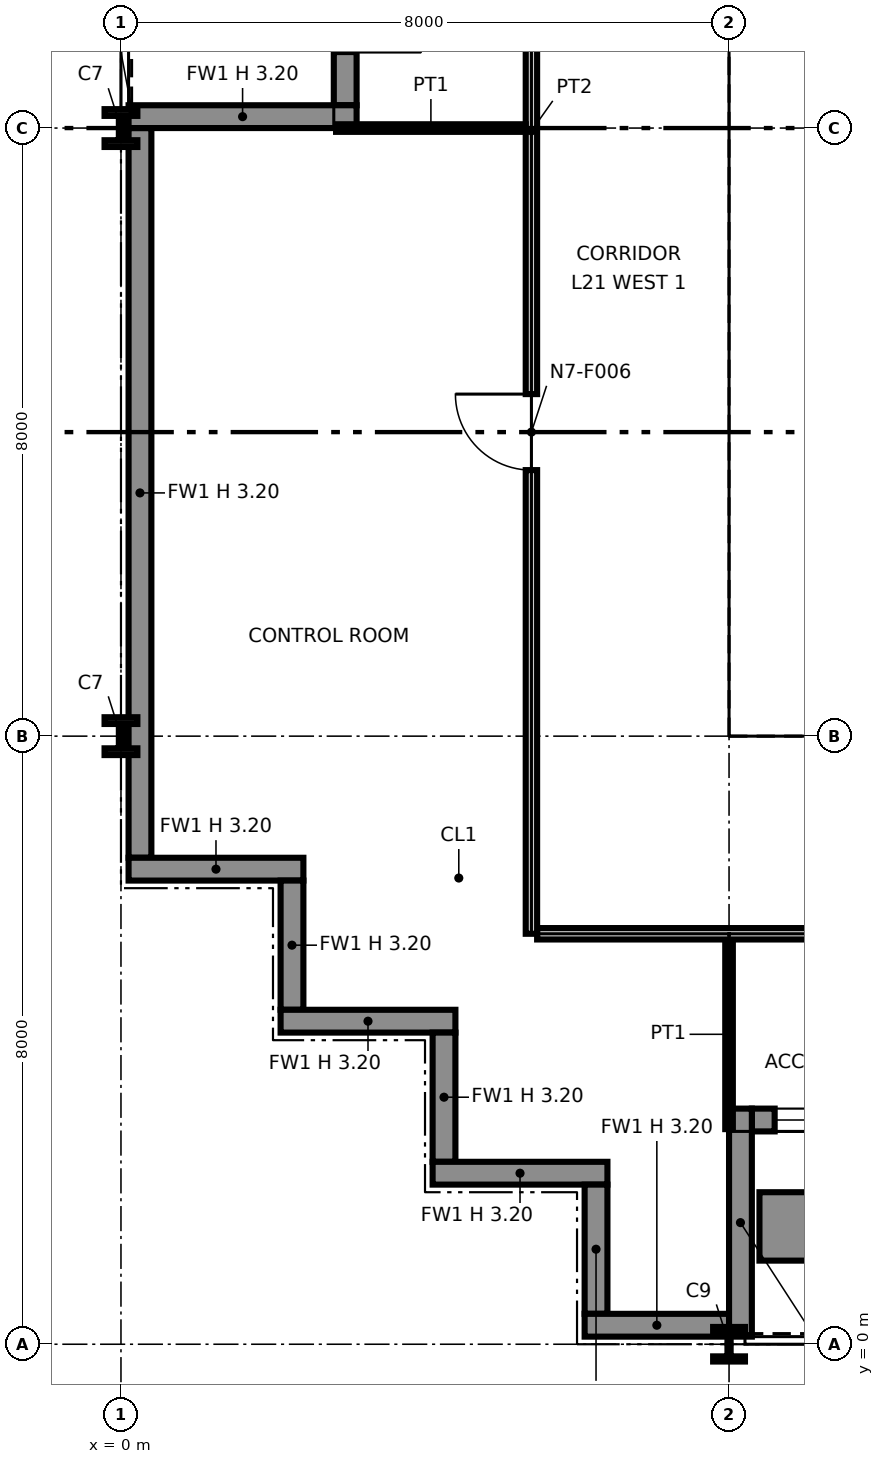
"""IFC4 building model, lengths in metres.
Left out: names, types, materials, properties, quantities, classifications, styles, units other than length and angle.
Written with IfcOpenShell. Run it as: python <this file> out.ifc"""

import sys

from ifc_helpers import new_model, si_unit, direction, frame, frame_2d, origin, origin_2d, place, context, subcontext, project, spatial, polyline, rectangle, i_section, outline, extrude, element, fill, save


model = new_model("IFC4")
c1 = context("Model", 3, precision=1e-05, world=origin(), true_north=direction((0.0, 1.0)))
c2 = subcontext(c1, "Body", "Model", "MODEL_VIEW")
j1 = project(units=[si_unit("LENGTHUNIT", "METRE"), si_unit("PLANEANGLEUNIT", "RADIAN")], contexts=[c1])
p1 = place(None, origin())
s1 = spatial("IfcSite", under=j1, at=p1, CompositionType="ELEMENT")
p2 = place(p1, origin())
s2 = spatial("IfcBuilding", under=s1, at=p2, CompositionType="ELEMENT")
p3 = place(p2, frame((0.0, 0.0, 109.6)))
s3 = spatial("IfcBuildingStorey", under=s2, at=p3, CompositionType="ELEMENT", Elevation=109.6)
for number, where, z_axis, x_axis in (
    (1, (0.0, 8.0, 0.0), (0.0, 0.0, 1.0), (1.0, 0.0, 0.0)),
    (2, (0.0, 16.0, 0.0), (0.0, 0.0, 1.0), (1.0, 0.0, 0.0)),
):
    element("IfcColumn", number, at=place(p3, frame(where, z_axis=z_axis, x_axis=x_axis)), inside=s3, PredefinedType="COLUMN", context=c2, shape_type="SweptSolid", body=[
        extrude(i_section(OverallWidth=0.432, OverallDepth=0.498, WebThickness=0.056, FlangeThickness=0.089, at=origin_2d()), origin(), (0.0, 0.0, 1.0), 4.15),
    ])
p4 = place(p3, frame((8.0, 0.0, 0.0), z_axis=(0.0, 0.0, 1.0), x_axis=(1.0, 0.0, 0.0)))
e3 = element("IfcColumn", 3, at=p4, inside=s3, PredefinedType="COLUMN", context=c2, shape_type="SweptSolid", body=[
    extrude(i_section(OverallWidth=0.419, OverallDepth=0.455, WebThickness=0.042, FlangeThickness=0.068, at=origin_2d()), origin(), (0.0, 0.0, 1.0), 4.15),
])
for number, where, z_axis, x_axis in (
    (4, (8.0, 8.0, 0.0), (0.0, 0.0, 1.0), (1.0, 0.0, 0.0)),
    (5, (8.0, 16.0, 0.0), (0.0, 0.0, 1.0), (1.0, 0.0, 0.0)),
):
    element("IfcColumn", number, at=place(p3, frame(where, z_axis=z_axis, x_axis=x_axis)), inside=s3, PredefinedType="COLUMN", context=c2, shape_type="SweptSolid", body=[
        extrude(i_section(OverallWidth=0.406, OverallDepth=0.417, WebThickness=0.03, FlangeThickness=0.048, at=origin_2d()), origin(), (0.0, 0.0, 1.0), 4.15),
    ])
p5 = place(p3, frame((2.95, 23.7, 0.0), z_axis=(0.0, 0.0, 1.0), x_axis=(0.0, -1.0, 0.0)))
e6 = element("IfcWall", 6, at=p5, inside=s3, PredefinedType="SOLIDWALL", context=c2, shape_type="SweptSolid", body=[
    extrude(rectangle(XDim=7.4, YDim=0.3, at=frame_2d((3.7, 0.0))), origin(), (0.0, 0.0, 1.0), 3.547),
])
p6 = place(p5, frame((0.3, 0.0, 0.9)))
e7 = element("IfcOpeningElement", 7, at=p6, cuts=e6, PredefinedType="OPENING", context=c2, shape_type="SweptSolid", body=[
    extrude(rectangle(XDim=2.8, YDim=2.2, at=frame_2d((1.4, 1.1))), frame((0.0, 0.16, 0.0), z_axis=(0.0, -1.0, 0.0), x_axis=(1.0, 0.0, 0.0)), (0.0, 0.0, 1.0), 0.32),
])
p7 = place(p5, frame((4.7, 0.0, 0.0)))
e8 = element("IfcOpeningElement", 8, at=p7, cuts=e6, PredefinedType="OPENING", context=c2, shape_type="SweptSolid", body=[
    extrude(rectangle(XDim=2.0, YDim=2.4, at=frame_2d((1.0, 1.2))), frame((0.0, 0.16, 0.0), z_axis=(0.0, -1.0, 0.0), x_axis=(1.0, 0.0, 0.0)), (0.0, 0.0, 1.0), 0.32),
])
p8 = place(p3, frame((0.1, 16.15, 0.0), z_axis=(0.0, 0.0, 1.0), x_axis=(1.0, 0.0, 0.0)))
e9 = element("IfcWall", 9, at=p8, inside=s3, PredefinedType="SOLIDWALL", context=c2, shape_type="SweptSolid", body=[
    extrude(rectangle(XDim=3.0, YDim=0.3, at=frame_2d((1.5, 0.0))), origin(), (0.0, 0.0, 1.0), 3.199),
])
p9 = place(p3, frame((0.25, 16.0, 0.0), z_axis=(0.0, 0.0, 1.0), x_axis=(0.0, -1.0, 0.0)))
e10 = element("IfcWall", 10, at=p9, inside=s3, PredefinedType="SOLIDWALL", context=c2, shape_type="SweptSolid", body=[
    extrude(rectangle(XDim=9.6, YDim=0.3, at=frame_2d((4.8, 0.0))), origin(), (0.0, 0.0, 1.0), 3.199),
])
p10 = place(p3, frame((0.1, 6.25, 0.0), z_axis=(0.0, 0.0, 1.0), x_axis=(1.0, 0.0, 0.0)))
e11 = element("IfcWall", 11, at=p10, inside=s3, PredefinedType="SOLIDWALL", context=c2, shape_type="SweptSolid", body=[
    extrude(rectangle(XDim=2.3, YDim=0.3, at=frame_2d((1.15, 0.0))), origin(), (0.0, 0.0, 1.0), 3.199),
])
p11 = place(p3, frame((2.25, 6.1, 0.0), z_axis=(0.0, 0.0, 1.0), x_axis=(0.0, -1.0, 0.0)))
e12 = element("IfcWall", 12, at=p11, inside=s3, PredefinedType="SOLIDWALL", context=c2, shape_type="SweptSolid", body=[
    extrude(rectangle(XDim=1.7, YDim=0.3, at=frame_2d((0.85, 0.0))), origin(), (0.0, 0.0, 1.0), 3.199),
])
p12 = place(p3, frame((2.1, 4.25, 0.0), z_axis=(0.0, 0.0, 1.0), x_axis=(1.0, 0.0, 0.0)))
e13 = element("IfcWall", 13, at=p12, inside=s3, PredefinedType="SOLIDWALL", context=c2, shape_type="SweptSolid", body=[
    extrude(rectangle(XDim=2.3, YDim=0.3, at=frame_2d((1.15, 0.0))), origin(), (0.0, 0.0, 1.0), 3.199),
])
p13 = place(p3, frame((4.25, 4.1, 0.0), z_axis=(0.0, 0.0, 1.0), x_axis=(0.0, -1.0, 0.0)))
e14 = element("IfcWall", 14, at=p13, inside=s3, PredefinedType="SOLIDWALL", context=c2, shape_type="SweptSolid", body=[
    extrude(rectangle(XDim=1.7, YDim=0.3, at=frame_2d((0.85, 0.0))), origin(), (0.0, 0.0, 1.0), 3.199),
])
p14 = place(p3, frame((4.1, 2.25, 0.0), z_axis=(0.0, 0.0, 1.0), x_axis=(1.0, 0.0, 0.0)))
e15 = element("IfcWall", 15, at=p14, inside=s3, PredefinedType="SOLIDWALL", context=c2, shape_type="SweptSolid", body=[
    extrude(rectangle(XDim=2.3, YDim=0.3, at=frame_2d((1.15, 0.0))), origin(), (0.0, 0.0, 1.0), 3.199),
])
p15 = place(p3, frame((6.25, 2.1, 0.0), z_axis=(0.0, 0.0, 1.0), x_axis=(0.0, -1.0, 0.0)))
e16 = element("IfcWall", 16, at=p15, inside=s3, PredefinedType="SOLIDWALL", context=c2, shape_type="SweptSolid", body=[
    extrude(rectangle(XDim=1.7, YDim=0.3, at=frame_2d((0.85, 0.0))), origin(), (0.0, 0.0, 1.0), 3.199),
])
p16 = place(p3, frame((6.1, 0.25, 0.0), z_axis=(0.0, 0.0, 1.0), x_axis=(1.0, 0.0, 0.0)))
e17 = element("IfcWall", 17, at=p16, inside=s3, PredefinedType="SOLIDWALL", context=c2, shape_type="SweptSolid", body=[
    extrude(rectangle(XDim=1.9, YDim=0.3, at=frame_2d((0.95, 0.0))), origin(), (0.0, 0.0, 1.0), 3.199),
])
p17 = place(p3, frame((8.3, 2.95, 0.0), z_axis=(0.0, 0.0, 1.0), x_axis=(1.0, 0.0, 0.0)))
e18 = element("IfcWall", 18, at=p17, inside=s3, PredefinedType="SOLIDWALL", context=c2, shape_type="SweptSolid", body=[
    extrude(rectangle(XDim=7.4, YDim=0.3, at=frame_2d((3.7, 0.0))), origin(), (0.0, 0.0, 1.0), 4.15),
])
p18 = place(p17, frame((0.3, 0.0, 0.9)))
e19 = element("IfcOpeningElement", 19, at=p18, cuts=e18, PredefinedType="OPENING", context=c2, shape_type="SweptSolid", body=[
    extrude(rectangle(XDim=2.8, YDim=2.2, at=frame_2d((1.4, 1.1))), frame((0.0, 0.16, 0.0), z_axis=(0.0, -1.0, 0.0), x_axis=(1.0, 0.0, 0.0)), (0.0, 0.0, 1.0), 0.32),
])
p19 = place(p17, frame((4.7, 0.0, 0.0)))
e20 = element("IfcOpeningElement", 20, at=p19, cuts=e18, PredefinedType="OPENING", context=c2, shape_type="SweptSolid", body=[
    extrude(rectangle(XDim=2.0, YDim=2.4, at=frame_2d((1.0, 1.2))), frame((0.0, 0.16, 0.0), z_axis=(0.0, -1.0, 0.0), x_axis=(1.0, 0.0, 0.0)), (0.0, 0.0, 1.0), 0.32),
])
p20 = place(p3, frame((8.15, 0.1, 0.0), z_axis=(0.0, 0.0, 1.0), x_axis=(0.0, 1.0, 0.0)))
e21 = element("IfcWall", 21, at=p20, inside=s3, PredefinedType="SOLIDWALL", context=c2, shape_type="SweptSolid", body=[
    extrude(rectangle(XDim=3.0, YDim=0.3, at=frame_2d((1.5, 0.0))), origin(), (0.0, 0.0, 1.0), 3.199),
])
p21 = place(p3, frame((8.4, 1.55, 0.0), z_axis=(0.0, 0.0, 1.0), x_axis=(1.0, 0.0, 0.0)))
e22 = element("IfcWall", 22, at=p21, inside=s3, PredefinedType="SOLIDWALL", context=c2, shape_type="SweptSolid", body=[
    extrude(rectangle(XDim=3.2, YDim=0.9, at=frame_2d((1.6, 0.0))), origin(), (0.0, 0.0, 1.0), 0.6),
])
p22 = place(p3, frame((8.65, 8.75, 0.0), z_axis=(0.0, 0.0, 1.0), x_axis=(1.0, 0.0, 0.0)))
e23 = element("IfcWall", 23, at=p22, inside=s3, PredefinedType="PARTITIONING", context=c2, shape_type="SweptSolid", body=[
    extrude(outline(polyline([(0.0, 0.0), (14.7, 0.0), (14.7, 4.15), (7.489, 4.15), (7.488, 3.382), (7.212, 3.382), (7.211, 4.15), (0.0, 4.15), (0.0, 0.0)])), frame((0.0, 0.1, 0.0), z_axis=(0.0, -1.0, 0.0), x_axis=(1.0, 0.0, 0.0)), (0.0, 0.0, 1.0), 0.2),
])
p23 = place(p22, frame((1.3, 0.0, 0.0)))
e24 = element("IfcOpeningElement", 24, at=p23, cuts=e23, PredefinedType="OPENING", context=c2, shape_type="SweptSolid", body=[
    extrude(rectangle(XDim=1.4, YDim=2.1, at=frame_2d((0.7, 1.05))), frame((0.0, 0.11, 0.0), z_axis=(0.0, -1.0, 0.0), x_axis=(1.0, 0.0, 0.0)), (0.0, 0.0, 1.0), 0.22),
])
p24 = place(p22, frame((4.6, 0.0, 0.0)))
e25 = element("IfcOpeningElement", 25, at=p24, cuts=e23, PredefinedType="OPENING", context=c2, shape_type="SweptSolid", body=[
    extrude(rectangle(XDim=1.4, YDim=2.1, at=frame_2d((0.7, 1.05))), frame((0.0, 0.11, 0.0), z_axis=(0.0, -1.0, 0.0), x_axis=(1.0, 0.0, 0.0)), (0.0, 0.0, 1.0), 0.22),
])
p25 = place(p22, frame((10.4, 0.0, 0.0)))
e26 = element("IfcOpeningElement", 26, at=p25, cuts=e23, PredefinedType="OPENING", context=c2, shape_type="SweptSolid", body=[
    extrude(rectangle(XDim=1.2, YDim=2.1, at=frame_2d((0.6, 1.05))), frame((0.0, 0.11, 0.0), z_axis=(0.0, -1.0, 0.0), x_axis=(1.0, 0.0, 0.0)), (0.0, 0.0, 1.0), 0.22),
])
p26 = place(p3, frame((8.75, 8.85, 0.0), z_axis=(0.0, 0.0, 1.0), x_axis=(0.0, 1.0, 0.0)))
e27 = element("IfcWall", 27, at=p26, inside=s3, PredefinedType="PARTITIONING", context=c2, shape_type="SweptSolid", body=[
    extrude(outline(polyline([(0.0, 0.0), (14.3, 0.0), (14.3, 4.15), (10.269, 4.15), (10.268, 3.542), (10.032, 3.542), (10.031, 4.15), (7.289, 4.15), (7.288, 3.382), (7.012, 3.382), (7.011, 4.15), (0.0, 4.15), (0.0, 0.0)])), frame((0.0, 0.1, 0.0), z_axis=(0.0, -1.0, 0.0), x_axis=(1.0, 0.0, 0.0)), (0.0, 0.0, 1.0), 0.2),
])
p27 = place(p26, frame((8.3, 0.0, 0.0)))
e28 = element("IfcOpeningElement", 28, at=p27, cuts=e27, PredefinedType="OPENING", context=c2, shape_type="SweptSolid", body=[
    extrude(rectangle(XDim=1.8, YDim=2.1, at=frame_2d((0.9, 1.05))), frame((0.0, 0.11, 0.0), z_axis=(0.0, -1.0, 0.0), x_axis=(1.0, 0.0, 0.0)), (0.0, 0.0, 1.0), 0.22),
])
p28 = place(p3, frame((8.85, 16.0, 0.0), z_axis=(0.0, 0.0, 1.0), x_axis=(1.0, 0.0, 0.0)))
e29 = element("IfcWall", 29, at=p28, inside=s3, PredefinedType="PARTITIONING", context=c2, shape_type="SweptSolid", body=[
    extrude(rectangle(XDim=6.931, YDim=0.6, at=frame_2d((3.466, 0.0))), origin(), (0.0, 0.0, 1.0), 3.382),
])
p29 = place(p3, frame((8.0, 2.83, 0.0), z_axis=(0.0, 0.0, 1.0), x_axis=(0.0, 1.0, 0.0)))
e30 = element("IfcWall", 30, at=p29, inside=s3, PredefinedType="PARTITIONING", context=c2, shape_type="SweptSolid", body=[
    extrude(rectangle(XDim=2.495, YDim=0.1, at=frame_2d((1.248, 0.0))), origin(), (0.0, 0.0, 1.0), 3.194),
])
p30 = place(p3, frame((5.475, 5.4, 0.0), z_axis=(0.0, 0.0, 1.0), x_axis=(1.0, 0.0, 0.0)))
e31 = element("IfcWall", 31, at=p30, inside=s3, PredefinedType="PARTITIONING", context=c2, shape_type="SweptSolid", body=[
    extrude(rectangle(XDim=21.05, YDim=0.15, at=frame_2d((10.525, 0.0))), origin(), (0.0, 0.0, 1.0), 3.194),
])
p31 = place(p30, frame((13.025, 0.0, 0.0), z_axis=(0.0, 0.0, 1.0), x_axis=(-1.0, 0.0, 0.0)))
e32 = element("IfcOpeningElement", 32, at=p31, cuts=e31, PredefinedType="OPENING", context=c2, shape_type="SweptSolid", body=[
    extrude(rectangle(XDim=1.0, YDim=2.1, at=frame_2d((0.5, 1.05))), frame((0.0, 0.085, 0.0), z_axis=(0.0, -1.0, 0.0), x_axis=(1.0, 0.0, 0.0)), (0.0, 0.0, 1.0), 0.17),
])
p32 = place(p30, frame((17.025, 0.0, 0.0), z_axis=(0.0, 0.0, 1.0), x_axis=(-1.0, 0.0, 0.0)))
e33 = element("IfcOpeningElement", 33, at=p32, cuts=e31, PredefinedType="OPENING", context=c2, shape_type="SweptSolid", body=[
    extrude(rectangle(XDim=1.0, YDim=2.1, at=frame_2d((0.5, 1.05))), frame((0.0, 0.085, 0.0), z_axis=(0.0, -1.0, 0.0), x_axis=(1.0, 0.0, 0.0)), (0.0, 0.0, 1.0), 0.17),
])
p33 = place(p30, frame((5.025, 0.0, 0.0), z_axis=(0.0, 0.0, 1.0), x_axis=(-1.0, 0.0, 0.0)))
e34 = element("IfcOpeningElement", 34, at=p33, cuts=e31, PredefinedType="OPENING", context=c2, shape_type="SweptSolid", body=[
    extrude(rectangle(XDim=1.0, YDim=2.1, at=frame_2d((0.5, 1.05))), frame((0.0, 0.085, 0.0), z_axis=(0.0, -1.0, 0.0), x_axis=(1.0, 0.0, 0.0)), (0.0, 0.0, 1.0), 0.17),
])
p34 = place(p30, frame((9.025, 0.0, 0.0), z_axis=(0.0, 0.0, 1.0), x_axis=(-1.0, 0.0, 0.0)))
e35 = element("IfcOpeningElement", 35, at=p34, cuts=e31, PredefinedType="OPENING", context=c2, shape_type="SweptSolid", body=[
    extrude(rectangle(XDim=1.0, YDim=2.1, at=frame_2d((0.5, 1.05))), frame((0.0, 0.085, 0.0), z_axis=(0.0, -1.0, 0.0), x_axis=(1.0, 0.0, 0.0)), (0.0, 0.0, 1.0), 0.17),
])
p35 = place(p30, frame((18.925, 0.0, 0.0)))
e36 = element("IfcOpeningElement", 36, at=p35, cuts=e31, PredefinedType="OPENING", context=c2, shape_type="SweptSolid", body=[
    extrude(rectangle(XDim=1.8, YDim=2.1, at=frame_2d((0.9, 1.05))), frame((0.0, 0.085, 0.0), z_axis=(0.0, -1.0, 0.0), x_axis=(1.0, 0.0, 0.0)), (0.0, 0.0, 1.0), 0.17),
])
p36 = place(p3, frame((5.4, 5.4, 0.0), z_axis=(0.0, 0.0, 1.0), x_axis=(0.0, 1.0, 0.0)))
e37 = element("IfcWall", 37, at=p36, inside=s3, PredefinedType="PARTITIONING", context=c2, shape_type="SweptSolid", body=[
    extrude(rectangle(XDim=21.125, YDim=0.15, at=frame_2d((10.562, 0.0))), origin(), (0.0, 0.0, 1.0), 3.194),
])
p37 = place(p36, frame((6.1, 0.0, 0.0)))
e38 = element("IfcOpeningElement", 38, at=p37, cuts=e37, PredefinedType="OPENING", context=c2, shape_type="SweptSolid", body=[
    extrude(rectangle(XDim=1.0, YDim=2.1, at=frame_2d((0.5, 1.05))), frame((0.0, 0.085, 0.0), z_axis=(0.0, -1.0, 0.0), x_axis=(1.0, 0.0, 0.0)), (0.0, 0.0, 1.0), 0.17),
])
p38 = place(p36, frame((11.825, 0.0, 0.0)))
e39 = element("IfcOpeningElement", 39, at=p38, cuts=e37, PredefinedType="OPENING", context=c2, shape_type="SweptSolid", body=[
    extrude(rectangle(XDim=1.0, YDim=2.1, at=frame_2d((0.5, 1.05))), frame((0.0, 0.085, 0.0), z_axis=(0.0, -1.0, 0.0), x_axis=(1.0, 0.0, 0.0)), (0.0, 0.0, 1.0), 0.17),
])
p39 = place(p36, frame((16.1, 0.0, 0.0)))
e40 = element("IfcOpeningElement", 40, at=p39, cuts=e37, PredefinedType="OPENING", context=c2, shape_type="SweptSolid", body=[
    extrude(rectangle(XDim=1.0, YDim=2.1, at=frame_2d((0.5, 1.05))), frame((0.0, 0.085, 0.0), z_axis=(0.0, -1.0, 0.0), x_axis=(1.0, 0.0, 0.0)), (0.0, 0.0, 1.0), 0.17),
])
p40 = place(p36, frame((19.4, 0.0, 0.0)))
e41 = element("IfcOpeningElement", 41, at=p40, cuts=e37, PredefinedType="OPENING", context=c2, shape_type="SweptSolid", body=[
    extrude(rectangle(XDim=1.0, YDim=2.1, at=frame_2d((0.5, 1.05))), frame((0.0, 0.085, 0.0), z_axis=(0.0, -1.0, 0.0), x_axis=(1.0, 0.0, 0.0)), (0.0, 0.0, 1.0), 0.17),
])
p41 = place(p3, frame((2.83, 16.0, 0.0), z_axis=(0.0, 0.0, 1.0), x_axis=(1.0, 0.0, 0.0)))
e42 = element("IfcWall", 42, at=p41, inside=s3, PredefinedType="PARTITIONING", context=c2, shape_type="SweptSolid", body=[
    extrude(rectangle(XDim=2.495, YDim=0.1, at=frame_2d((1.248, 0.0))), origin(), (0.0, 0.0, 1.0), 3.194),
])
p42 = place(p18, origin())
e43 = element("IfcWindow", 43, at=p42, inside=s3, PartitioningType="SINGLE_PANEL", PredefinedType="WINDOW", context=c2, shape_type="SweptSolid", body=[
    extrude(rectangle(XDim=2.8, YDim=2.2, at=frame_2d((1.4, 1.1))), frame((0.0, 0.03, 0.0), z_axis=(0.0, -1.0, 0.0), x_axis=(1.0, 0.0, 0.0)), (0.0, 0.0, 1.0), 0.06),
])
fill(e19, e43)
p43 = place(p37, origin())
e44 = element("IfcDoor", 44, at=p43, inside=s3, OperationType="SINGLE_SWING_RIGHT", PredefinedType="DOOR", context=c2, shape_type="SweptSolid", body=[
    extrude(rectangle(XDim=1.0, YDim=2.1, at=frame_2d((0.5, 1.05))), frame((0.0, 0.025, 0.0), z_axis=(0.0, -1.0, 0.0), x_axis=(1.0, 0.0, 0.0)), (0.0, 0.0, 1.0), 0.05),
])
fill(e38, e44)
save(model, sys.argv[1])
